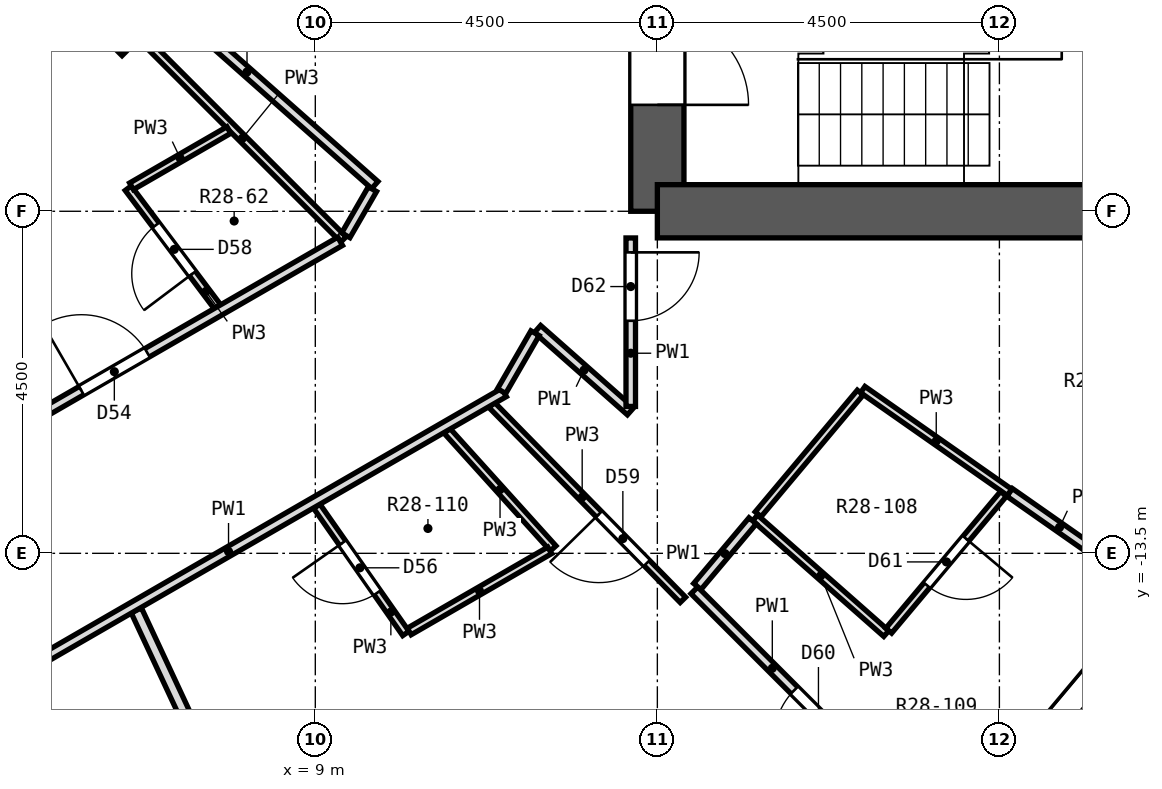
"""IFC4 building model, lengths in metres.
Left out: names, types, materials, properties, quantities, classifications, styles, units other than length and angle.
Written with IfcOpenShell. Run it as: python <this file> out.ifc"""

import sys

from ifc_helpers import new_model, si_unit, direction, frame, frame_2d, origin, origin_2d, place, context, subcontext, project, spatial, rectangle, extrude, element, fill, save


model = new_model("IFC4")
c1 = context("Model", 3, precision=1e-05, world=origin(), true_north=direction((0.0, 1.0)))
c2 = subcontext(c1, "Body", "Model", "MODEL_VIEW")
j1 = project(units=[si_unit("LENGTHUNIT", "METRE"), si_unit("PLANEANGLEUNIT", "RADIAN")], contexts=[c1])
p1 = place(None, origin())
s1 = spatial("IfcSite", under=j1, at=p1, CompositionType="ELEMENT")
p2 = place(p1, origin())
s2 = spatial("IfcBuilding", under=s1, at=p2, CompositionType="ELEMENT")
p3 = place(p2, frame((0.0, 0.0, 190.5)))
s3 = spatial("IfcBuildingStorey", under=s2, at=p3, CompositionType="ELEMENT", Elevation=190.5)
p4 = place(p3, frame((6.458, -6.458, 0.0), z_axis=(0.0, 0.0, 1.0), x_axis=(0.707106781187, -0.707106781187, 0.0)))
e1 = element("IfcColumn", 1, at=p4, inside=s3, PredefinedType="COLUMN", context=c2, shape_type="SweptSolid", body=[
    extrude(rectangle(XDim=0.7, YDim=0.7, at=origin_2d()), origin(), (0.0, 0.0, 1.0), 3.3),
])
p5 = place(p3, frame((13.5, -9.0, 0.0), z_axis=(0.0, 0.0, 1.0), x_axis=(0.0, 1.0, 0.0)))
e2 = element("IfcWall", 2, at=p5, inside=s3, PredefinedType="SHEAR", context=c2, shape_type="SweptSolid", body=[
    extrude(rectangle(XDim=18.0, YDim=0.7, at=frame_2d((9.0, 0.0))), origin(), (0.0, 0.0, 1.0), 3.3),
])
p6 = place(p5, frame((15.4, 0.0, 0.0)))
e3 = element("IfcOpeningElement", 3, at=p6, cuts=e2, PredefinedType="OPENING", context=c2, shape_type="SweptSolid", body=[
    extrude(rectangle(XDim=1.2, YDim=2.1, at=frame_2d((0.6, 1.05))), frame((0.0, 0.362, 0.0), z_axis=(0.0, -1.0, 0.0), x_axis=(1.0, 0.0, 0.0)), (0.0, 0.0, 1.0), 0.724),
])
p7 = place(p5, frame((1.4, 0.0, 0.0)))
e4 = element("IfcOpeningElement", 4, at=p7, cuts=e2, PredefinedType="OPENING", context=c2, shape_type="SweptSolid", body=[
    extrude(rectangle(XDim=1.2, YDim=2.1, at=frame_2d((0.6, 1.05))), frame((0.0, 0.362, 0.0), z_axis=(0.0, -1.0, 0.0), x_axis=(1.0, 0.0, 0.0)), (0.0, 0.0, 1.0), 0.724),
])
p8 = place(p5, frame((7.5, 0.0, 0.0)))
e5 = element("IfcOpeningElement", 5, at=p8, cuts=e2, PredefinedType="OPENING", context=c2, shape_type="SweptSolid", body=[
    extrude(rectangle(XDim=3.0, YDim=2.4, at=frame_2d((1.5, 1.2))), frame((0.0, 0.362, 0.0), z_axis=(0.0, -1.0, 0.0), x_axis=(1.0, 0.0, 0.0)), (0.0, 0.0, 1.0), 0.724),
])
p9 = place(p3, frame((13.5, -9.0, 0.0), z_axis=(0.0, 0.0, 1.0), x_axis=(1.0, 0.0, 0.0)))
e6 = element("IfcWall", 6, at=p9, inside=s3, PredefinedType="SHEAR", context=c2, shape_type="SweptSolid", body=[
    extrude(rectangle(XDim=8.0, YDim=0.7, at=frame_2d((4.0, 0.0))), origin(), (0.0, 0.0, 1.0), 3.3),
])
p10 = place(p3, frame((17.74, -17.137, 0.0), z_axis=(0.0, 0.0, 1.0), x_axis=(0.642770398358, 0.766058884809, 0.0)))
e7 = element("IfcWall", 7, at=p10, inside=s3, PredefinedType="SOLIDWALL", context=c2, shape_type="SweptSolid", body=[
    extrude(rectangle(XDim=3.449, YDim=0.6, at=frame_2d((1.725, 0.0))), origin(), (0.0, 0.0, 1.0), 2.85),
])
p11 = place(p10, frame((0.625, 0.0, 0.9)))
e8 = element("IfcOpeningElement", 8, at=p11, cuts=e7, PredefinedType="OPENING", context=c2, shape_type="SweptSolid", body=[
    extrude(rectangle(XDim=2.2, YDim=1.8, at=frame_2d((1.1, 0.9))), frame((0.0, 0.312, 0.0), z_axis=(0.0, -1.0, 0.0), x_axis=(1.0, 0.0, 0.0)), (0.0, 0.0, 1.0), 0.624),
])
p12 = place(p3, frame((2.474, -8.156, 0.0), z_axis=(0.0, 0.0, 1.0), x_axis=(0.866005929495, 0.500033728941, 0.0)))
e9 = element("IfcWall", 9, at=p12, inside=s3, PredefinedType="SOLIDWALL", context=c2, shape_type="SweptSolid", body=[
    extrude(rectangle(XDim=3.87, YDim=0.6, at=frame_2d((1.935, 0.0))), origin(), (0.0, 0.0, 1.0), 2.85),
])
p13 = place(p12, frame((0.735, 0.0, 0.9)))
e10 = element("IfcOpeningElement", 10, at=p13, cuts=e9, PredefinedType="OPENING", context=c2, shape_type="SweptSolid", body=[
    extrude(rectangle(XDim=2.4, YDim=1.8, at=frame_2d((1.2, 0.9))), frame((0.0, 0.312, 0.0), z_axis=(0.0, -1.0, 0.0), x_axis=(1.0, 0.0, 0.0)), (0.0, 0.0, 1.0), 0.624),
])
p14 = place(p3, frame((6.645, -14.249, 0.0), z_axis=(0.0, 0.0, 1.0), x_axis=(0.422700425591, -0.90626946887, 0.0)))
e11 = element("IfcWall", 11, at=p14, inside=s3, PredefinedType="PARTITIONING", context=c2, shape_type="SweptSolid", body=[
    extrude(rectangle(XDim=8.018, YDim=0.15, at=frame_2d((4.009, 0.0))), origin(), (0.0, 0.0, 1.0), 2.85),
])
p15 = place(p14, frame((2.002, 0.0, 0.0)))
e12 = element("IfcOpeningElement", 12, at=p15, cuts=e11, PredefinedType="OPENING", context=c2, shape_type="SweptSolid", body=[
    extrude(rectangle(XDim=1.0, YDim=2.1, at=frame_2d((0.5, 1.05))), frame((0.0, 0.087, 0.0), z_axis=(0.0, -1.0, 0.0), x_axis=(1.0, 0.0, 0.0)), (0.0, 0.0, 1.0), 0.174),
])
p16 = place(p3, frame((9.019, -12.88, 0.0), z_axis=(0.0, 0.0, 1.0), x_axis=(0.573550536535, -0.819170178925, 0.0)))
e13 = element("IfcWall", 13, at=p16, inside=s3, PredefinedType="PARTITIONING", context=c2, shape_type="SweptSolid", body=[
    extrude(rectangle(XDim=2.044, YDim=0.1, at=frame_2d((1.022, 0.0))), origin(), (0.0, 0.0, 1.0), 2.85),
])
p17 = place(p16, frame((0.59, 0.0, 0.0)))
e14 = element("IfcOpeningElement", 14, at=p17, cuts=e13, PredefinedType="OPENING", context=c2, shape_type="SweptSolid", body=[
    extrude(rectangle(XDim=0.8, YDim=2.1, at=frame_2d((0.4, 1.05))), frame((0.0, 0.062, 0.0), z_axis=(0.0, -1.0, 0.0), x_axis=(1.0, 0.0, 0.0)), (0.0, 0.0, 1.0), 0.124),
])
p18 = place(p3, frame((6.539, -8.696, 0.0), z_axis=(0.0, 0.0, 1.0), x_axis=(0.601120334692, -0.799158521959, 0.0)))
e15 = element("IfcWall", 15, at=p18, inside=s3, PredefinedType="PARTITIONING", context=c2, shape_type="SweptSolid", body=[
    extrude(rectangle(XDim=1.951, YDim=0.1, at=frame_2d((0.976, 0.0))), origin(), (0.0, 0.0, 1.0), 2.85),
])
p19 = place(p18, frame((0.607, 0.0, 0.0)))
e16 = element("IfcOpeningElement", 16, at=p19, cuts=e15, PredefinedType="OPENING", context=c2, shape_type="SweptSolid", body=[
    extrude(rectangle(XDim=0.8, YDim=2.1, at=frame_2d((0.4, 1.05))), frame((0.0, 0.062, 0.0), z_axis=(0.0, -1.0, 0.0), x_axis=(1.0, 0.0, 0.0)), (0.0, 0.0, 1.0), 0.124),
])
p20 = place(p3, frame((10.732, -11.888, 0.0), z_axis=(0.0, 0.0, 1.0), x_axis=(0.670051109138, -0.742314967613, 0.0)))
e17 = element("IfcWall", 17, at=p20, inside=s3, PredefinedType="PARTITIONING", context=c2, shape_type="SweptSolid", body=[
    extrude(rectangle(XDim=2.084, YDim=0.1, at=frame_2d((1.042, 0.0))), origin(), (0.0, 0.0, 1.0), 2.85),
])
p21 = place(p3, frame((11.321, -11.547, 0.0), z_axis=(0.0, 0.0, 1.0), x_axis=(0.700209333058, -0.713937595241, 0.0)))
e18 = element("IfcWall", 18, at=p21, inside=s3, PredefinedType="PARTITIONING", context=c2, shape_type="SweptSolid", body=[
    extrude(rectangle(XDim=3.592, YDim=0.1, at=frame_2d((1.796, 0.0))), origin(), (0.0, 0.0, 1.0), 2.85),
])
p22 = place(p21, frame((2.014, 0.0, 0.0)))
e19 = element("IfcOpeningElement", 19, at=p22, cuts=e18, PredefinedType="OPENING", context=c2, shape_type="SweptSolid", body=[
    extrude(rectangle(XDim=0.9, YDim=2.1, at=frame_2d((0.45, 1.05))), frame((0.0, 0.062, 0.0), z_axis=(0.0, -1.0, 0.0), x_axis=(1.0, 0.0, 0.0)), (0.0, 0.0, 1.0), 0.124),
])
p23 = place(p3, frame((6.712, -6.712, 0.0), z_axis=(0.0, 0.0, 1.0), x_axis=(0.707106781187, -0.707106781187, 0.0)))
e20 = element("IfcWall", 20, at=p23, inside=s3, PredefinedType="PARTITIONING", context=c2, shape_type="SweptSolid", body=[
    extrude(rectangle(XDim=3.759, YDim=0.1, at=frame_2d((1.88, 0.0))), origin(), (0.0, 0.0, 1.0), 2.85),
])
p24 = place(p3, frame((13.987, -13.987, 0.0), z_axis=(0.0, 0.0, 1.0), x_axis=(0.707106781187, -0.707106781187, 0.0)))
e21 = element("IfcWall", 21, at=p24, inside=s3, PredefinedType="PARTITIONING", context=c2, shape_type="SweptSolid", body=[
    extrude(rectangle(XDim=3.959, YDim=0.125, at=frame_2d((1.979, 0.0))), origin(), (0.0, 0.0, 1.0), 2.85),
])
p25 = place(p24, frame((1.859, 0.0, 0.0)))
e22 = element("IfcOpeningElement", 22, at=p25, cuts=e21, PredefinedType="OPENING", context=c2, shape_type="SweptSolid", body=[
    extrude(rectangle(XDim=0.9, YDim=2.1, at=frame_2d((0.45, 1.05))), frame((0.0, 0.074, 0.0), z_axis=(0.0, -1.0, 0.0), x_axis=(1.0, 0.0, 0.0)), (0.0, 0.0, 1.0), 0.149),
])
p26 = place(p3, frame((11.923, -10.549, 0.0), z_axis=(0.0, 0.0, 1.0), x_axis=(0.749253207289, -0.662283648724, 0.0)))
e23 = element("IfcWall", 23, at=p26, inside=s3, PredefinedType="PARTITIONING", context=c2, shape_type="SweptSolid", body=[
    extrude(rectangle(XDim=1.634, YDim=0.125, at=frame_2d((0.817, 0.0))), origin(), (0.0, 0.0, 1.0), 2.85),
])
p27 = place(p3, frame((6.42, -5.68, 0.0), z_axis=(0.0, 0.0, 1.0), x_axis=(0.748958163245, -0.662617287511, 0.0)))
e24 = element("IfcWall", 24, at=p27, inside=s3, PredefinedType="PARTITIONING", context=c2, shape_type="SweptSolid", body=[
    extrude(rectangle(XDim=4.49, YDim=0.125, at=frame_2d((2.245, 0.0))), origin(), (0.0, 0.0, 1.0), 2.85),
])
p28 = place(p3, frame((14.786, -13.034, 0.0), z_axis=(0.0, 0.0, 1.0), x_axis=(0.750060726962, -0.661368963491, 0.0)))
e25 = element("IfcWall", 25, at=p28, inside=s3, PredefinedType="PARTITIONING", context=c2, shape_type="SweptSolid", body=[
    extrude(rectangle(XDim=2.301, YDim=0.1, at=frame_2d((1.151, 0.0))), origin(), (0.0, 0.0, 1.0), 2.85),
])
p29 = place(p3, frame((16.202, -11.346, 0.0), z_axis=(0.0, 0.0, 1.0), x_axis=(0.81919302467, -0.573517905851, 0.0)))
e26 = element("IfcWall", 26, at=p29, inside=s3, PredefinedType="PARTITIONING", context=c2, shape_type="SweptSolid", body=[
    extrude(rectangle(XDim=2.359, YDim=0.1, at=frame_2d((1.18, 0.0))), origin(), (0.0, 0.0, 1.0), 2.85),
])
p30 = place(p3, frame((18.135, -12.699, 0.0), z_axis=(0.0, 0.0, 1.0), x_axis=(0.819188933795, -0.57352374907, 0.0)))
e27 = element("IfcWall", 27, at=p30, inside=s3, PredefinedType="PARTITIONING", context=c2, shape_type="SweptSolid", body=[
    extrude(rectangle(XDim=1.601, YDim=0.125, at=frame_2d((0.801, 0.0))), origin(), (0.0, 0.0, 1.0), 2.85),
])
p31 = place(p3, frame((10.236, -14.528, 0.0), z_axis=(0.0, 0.0, 1.0), x_axis=(0.865995020583, 0.500052621557, 0.0)))
e28 = element("IfcWall", 28, at=p31, inside=s3, PredefinedType="PARTITIONING", context=c2, shape_type="SweptSolid", body=[
    extrude(rectangle(XDim=2.134, YDim=0.1, at=frame_2d((1.067, 0.0))), origin(), (0.0, 0.0, 1.0), 2.85),
])
p32 = place(p3, frame((4.234, -15.569, 0.0), z_axis=(0.0, 0.0, 1.0), x_axis=(0.866024799292, 0.50000104701, 0.0)))
e29 = element("IfcWall", 29, at=p32, inside=s3, PredefinedType="PARTITIONING", context=c2, shape_type="SweptSolid", body=[
    extrude(rectangle(XDim=8.37, YDim=0.125, at=frame_2d((4.185, 0.0))), origin(), (0.0, 0.0, 1.0), 2.85),
])
p33 = place(p3, frame((3.495, -12.762, 0.0), z_axis=(0.0, 0.0, 1.0), x_axis=(0.865996609613, 0.500049869652, 0.0)))
e30 = element("IfcWall", 30, at=p33, inside=s3, PredefinedType="PARTITIONING", context=c2, shape_type="SweptSolid", body=[
    extrude(rectangle(XDim=6.734, YDim=0.125, at=frame_2d((3.367, 0.0))), origin(), (0.0, 0.0, 1.0), 2.85),
])
p34 = place(p33, frame((2.804, 0.0, 0.0)))
e31 = element("IfcOpeningElement", 31, at=p34, cuts=e30, PredefinedType="OPENING", context=c2, shape_type="SweptSolid", body=[
    extrude(rectangle(XDim=1.0, YDim=2.1, at=frame_2d((0.5, 1.05))), frame((0.0, 0.074, 0.0), z_axis=(0.0, -1.0, 0.0), x_axis=(1.0, 0.0, 0.0)), (0.0, 0.0, 1.0), 0.149),
])
p35 = place(p3, frame((6.582, -8.671, 0.0), z_axis=(0.0, 0.0, 1.0), x_axis=(0.86582534463, 0.500346352636, 0.0)))
e32 = element("IfcWall", 32, at=p35, inside=s3, PredefinedType="PARTITIONING", context=c2, shape_type="SweptSolid", body=[
    extrude(rectangle(XDim=1.479, YDim=0.1, at=frame_2d((0.74, 0.0))), origin(), (0.0, 0.0, 1.0), 2.85),
])
p36 = place(p3, frame((14.026, -13.937, 0.0), z_axis=(0.0, 0.0, 1.0), x_axis=(0.644129091811, 0.764916801412, 0.0)))
e33 = element("IfcWall", 33, at=p36, inside=s3, PredefinedType="PARTITIONING", context=c2, shape_type="SweptSolid", body=[
    extrude(rectangle(XDim=1.13, YDim=0.125, at=frame_2d((0.565, 0.0))), origin(), (0.0, 0.0, 1.0), 2.85),
])
p37 = place(p3, frame((16.544, -14.518, 0.0), z_axis=(0.0, 0.0, 1.0), x_axis=(0.642675237257, 0.76613872074, 0.0)))
e34 = element("IfcWall", 34, at=p37, inside=s3, PredefinedType="PARTITIONING", context=c2, shape_type="SweptSolid", body=[
    extrude(rectangle(XDim=2.349, YDim=0.1, at=frame_2d((1.175, 0.0))), origin(), (0.0, 0.0, 1.0), 2.85),
])
p38 = place(p37, frame((0.781, 0.0, 0.0)))
e35 = element("IfcOpeningElement", 35, at=p38, cuts=e34, PredefinedType="OPENING", context=c2, shape_type="SweptSolid", body=[
    extrude(rectangle(XDim=0.8, YDim=2.1, at=frame_2d((0.4, 1.05))), frame((0.0, 0.062, 0.0), z_axis=(0.0, -1.0, 0.0), x_axis=(1.0, 0.0, 0.0)), (0.0, 0.0, 1.0), 0.124),
])
p39 = place(p3, frame((14.826, -12.986, 0.0), z_axis=(0.0, 0.0, 1.0), x_axis=(0.642720670629, 0.766100606674, 0.0)))
e36 = element("IfcWall", 36, at=p39, inside=s3, PredefinedType="PARTITIONING", context=c2, shape_type="SweptSolid", body=[
    extrude(rectangle(XDim=2.09, YDim=0.1, at=frame_2d((1.045, 0.0))), origin(), (0.0, 0.0, 1.0), 2.85),
])
p40 = place(p3, frame((11.451, -11.366, 0.0), z_axis=(0.0, 0.0, 1.0), x_axis=(0.500018690203, 0.866014612722, 0.0)))
e37 = element("IfcWall", 37, at=p40, inside=s3, PredefinedType="PARTITIONING", context=c2, shape_type="SweptSolid", body=[
    extrude(rectangle(XDim=0.88, YDim=0.125, at=frame_2d((0.44, 0.0))), origin(), (0.0, 0.0, 1.0), 2.85),
])
p41 = place(p3, frame((9.401, -9.316, 0.0), z_axis=(0.0, 0.0, 1.0), x_axis=(0.500074377092, 0.865982457891, 0.0)))
e38 = element("IfcWall", 38, at=p41, inside=s3, PredefinedType="PARTITIONING", context=c2, shape_type="SweptSolid", body=[
    extrude(rectangle(XDim=0.701, YDim=0.125, at=frame_2d((0.35, 0.0))), origin(), (0.0, 0.0, 1.0), 2.85),
])
p42 = place(p3, frame((13.15, -11.567, 0.0), z_axis=(0.0, 0.0, 1.0), x_axis=(0.0, 1.0, 0.0)))
e39 = element("IfcWall", 39, at=p42, inside=s3, PredefinedType="PARTITIONING", context=c2, shape_type="SweptSolid", body=[
    extrude(rectangle(XDim=2.216, YDim=0.125, at=frame_2d((1.108, 0.0))), origin(), (0.0, 0.0, 1.0), 2.85),
])
p43 = place(p42, frame((1.127, 0.0, 0.0)))
e40 = element("IfcOpeningElement", 40, at=p43, cuts=e39, PredefinedType="OPENING", context=c2, shape_type="SweptSolid", body=[
    extrude(rectangle(XDim=0.9, YDim=2.1, at=frame_2d((0.45, 1.05))), frame((0.0, 0.074, 0.0), z_axis=(0.0, -1.0, 0.0), x_axis=(1.0, 0.0, 0.0)), (0.0, 0.0, 1.0), 0.149),
])
p44 = place(p11, origin())
e41 = element("IfcWindow", 41, at=p44, inside=s3, PartitioningType="SINGLE_PANEL", PredefinedType="WINDOW", context=c2, shape_type="SweptSolid", body=[
    extrude(rectangle(XDim=2.2, YDim=1.8, at=frame_2d((1.1, 0.9))), frame((0.0, 0.18, 0.0), z_axis=(0.0, -1.0, 0.0), x_axis=(1.0, 0.0, 0.0)), (0.0, 0.0, 1.0), 0.06),
])
fill(e8, e41)
p45 = place(p34, origin())
e42 = element("IfcDoor", 42, at=p45, inside=s3, OperationType="SINGLE_SWING_LEFT", PredefinedType="DOOR", context=c2, shape_type="SweptSolid", body=[
    extrude(rectangle(XDim=1.0, YDim=2.1, at=frame_2d((0.5, 1.05))), frame((0.0, 0.025, 0.0), z_axis=(0.0, -1.0, 0.0), x_axis=(1.0, 0.0, 0.0)), (0.0, 0.0, 1.0), 0.05),
])
fill(e31, e42)
p46 = place(p17, frame((0.8, 0.0, 0.0), z_axis=(0.0, 0.0, 1.0), x_axis=(-1.0, 0.0, 0.0)))
e43 = element("IfcDoor", 43, at=p46, inside=s3, OperationType="SINGLE_SWING_RIGHT", PredefinedType="DOOR", context=c2, shape_type="SweptSolid", body=[
    extrude(rectangle(XDim=0.8, YDim=2.1, at=frame_2d((0.4, 1.05))), frame((0.0, 0.025, 0.0), z_axis=(0.0, -1.0, 0.0), x_axis=(1.0, 0.0, 0.0)), (0.0, 0.0, 1.0), 0.05),
])
fill(e14, e43)
p47 = place(p19, frame((0.8, 0.0, 0.0), z_axis=(0.0, 0.0, 1.0), x_axis=(-1.0, 0.0, 0.0)))
e44 = element("IfcDoor", 44, at=p47, inside=s3, OperationType="SINGLE_SWING_LEFT", PredefinedType="DOOR", context=c2, shape_type="SweptSolid", body=[
    extrude(rectangle(XDim=0.8, YDim=2.1, at=frame_2d((0.4, 1.05))), frame((0.0, 0.025, 0.0), z_axis=(0.0, -1.0, 0.0), x_axis=(1.0, 0.0, 0.0)), (0.0, 0.0, 1.0), 0.05),
])
fill(e16, e44)
p48 = place(p22, frame((0.9, 0.0, 0.0), z_axis=(0.0, 0.0, 1.0), x_axis=(-1.0, 0.0, 0.0)))
e45 = element("IfcDoor", 45, at=p48, inside=s3, OperationType="SINGLE_SWING_RIGHT", PredefinedType="DOOR", context=c2, shape_type="SweptSolid", body=[
    extrude(rectangle(XDim=0.9, YDim=2.1, at=frame_2d((0.45, 1.05))), frame((0.0, 0.025, 0.0), z_axis=(0.0, -1.0, 0.0), x_axis=(1.0, 0.0, 0.0)), (0.0, 0.0, 1.0), 0.05),
])
fill(e19, e45)
p49 = place(p25, frame((0.9, 0.0, 0.0), z_axis=(0.0, 0.0, 1.0), x_axis=(-1.0, 0.0, 0.0)))
e46 = element("IfcDoor", 46, at=p49, inside=s3, OperationType="SINGLE_SWING_LEFT", PredefinedType="DOOR", context=c2, shape_type="SweptSolid", body=[
    extrude(rectangle(XDim=0.9, YDim=2.1, at=frame_2d((0.45, 1.05))), frame((0.0, 0.025, 0.0), z_axis=(0.0, -1.0, 0.0), x_axis=(1.0, 0.0, 0.0)), (0.0, 0.0, 1.0), 0.05),
])
fill(e22, e46)
p50 = place(p38, frame((0.8, 0.0, 0.0), z_axis=(0.0, 0.0, 1.0), x_axis=(-1.0, 0.0, 0.0)))
e47 = element("IfcDoor", 47, at=p50, inside=s3, OperationType="SINGLE_SWING_LEFT", PredefinedType="DOOR", context=c2, shape_type="SweptSolid", body=[
    extrude(rectangle(XDim=0.8, YDim=2.1, at=frame_2d((0.4, 1.05))), frame((0.0, 0.025, 0.0), z_axis=(0.0, -1.0, 0.0), x_axis=(1.0, 0.0, 0.0)), (0.0, 0.0, 1.0), 0.05),
])
fill(e35, e47)
p51 = place(p43, frame((0.9, 0.0, 0.0), z_axis=(0.0, 0.0, 1.0), x_axis=(-1.0, 0.0, 0.0)))
e48 = element("IfcDoor", 48, at=p51, inside=s3, OperationType="SINGLE_SWING_LEFT", PredefinedType="DOOR", context=c2, shape_type="SweptSolid", body=[
    extrude(rectangle(XDim=0.9, YDim=2.1, at=frame_2d((0.45, 1.05))), frame((0.0, 0.025, 0.0), z_axis=(0.0, -1.0, 0.0), x_axis=(1.0, 0.0, 0.0)), (0.0, 0.0, 1.0), 0.05),
])
fill(e40, e48)
p52 = place(p7, frame((1.2, 0.0, 0.0), z_axis=(0.0, 0.0, 1.0), x_axis=(-1.0, 0.0, 0.0)))
e49 = element("IfcDoor", 49, at=p52, inside=s3, OperationType="SINGLE_SWING_RIGHT", PredefinedType="DOOR", context=c2, shape_type="SweptSolid", body=[
    extrude(rectangle(XDim=1.2, YDim=2.1, at=frame_2d((0.6, 1.05))), frame((0.0, 0.025, 0.0), z_axis=(0.0, -1.0, 0.0), x_axis=(1.0, 0.0, 0.0)), (0.0, 0.0, 1.0), 0.05),
])
fill(e4, e49)
save(model, sys.argv[1])
